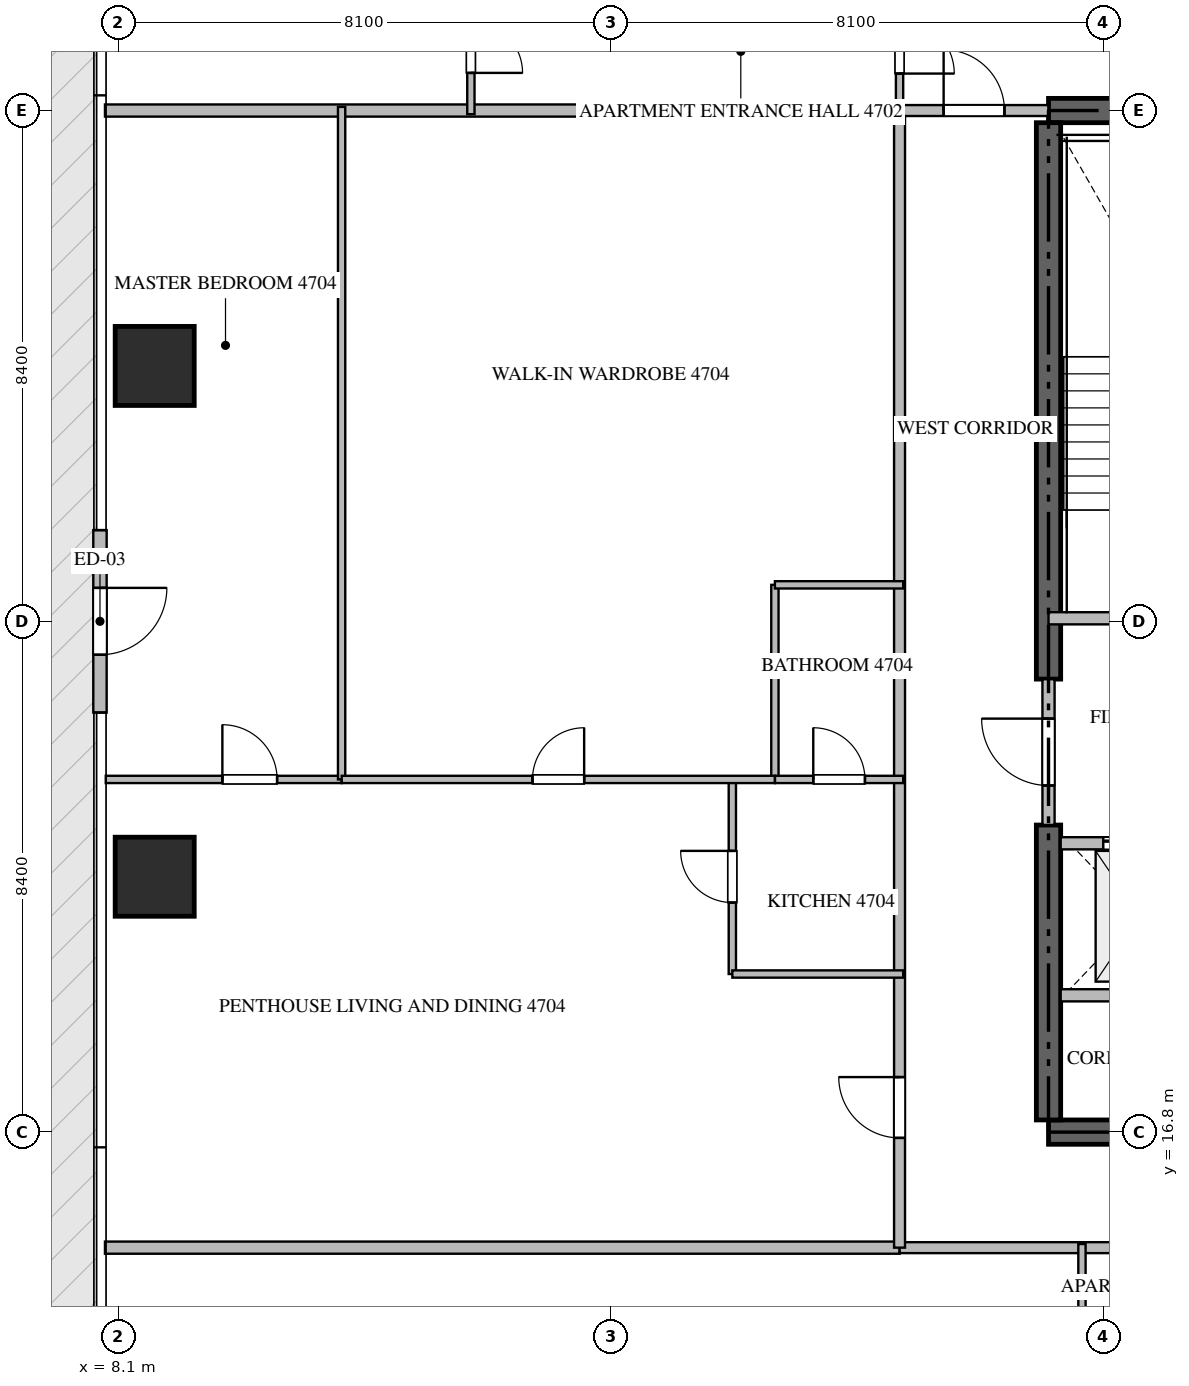
"""IFC4 building model, lengths in metres.
Left out: names, types, materials, properties, quantities, classifications, styles, units other than length and angle.
Written with IfcOpenShell. Run it as: python <this file> out.ifc"""

import sys

from ifc_helpers import new_model, si_unit, direction, frame, frame_2d, origin, origin_2d, place, context, subcontext, project, spatial, rectangle, extrude, source, transform, mapped, element, fill, save


model = new_model("IFC4")
c1 = context("Model", 3, precision=1e-05, world=origin(), true_north=direction((0.0, 1.0)))
c2 = subcontext(c1, "Body", "Model", "MODEL_VIEW")
j1 = project(units=[si_unit("LENGTHUNIT", "METRE"), si_unit("PLANEANGLEUNIT", "RADIAN")], contexts=[c1])
p1 = place(None, origin())
s1 = spatial("IfcSite", under=j1, at=p1, CompositionType="ELEMENT")
p2 = place(p1, origin())
s2 = spatial("IfcBuilding", under=s1, at=p2, CompositionType="ELEMENT")
p3 = place(p2, frame((0.0, 0.0, 187.65)))
s3 = spatial("IfcBuildingStorey", under=s2, at=p3, CompositionType="ELEMENT", Elevation=187.65)
for number, where, z_axis, x_axis in (
    (1, (23.4, 16.8, -0.26), (0.0, 0.0, 1.0), (1.0, 0.0, 0.0)),
    (2, (41.4, 33.6, -0.26), (0.0, 0.0, 1.0), (-1.0, 0.0, 0.0)),
):
    element("IfcWall", number, at=place(p3, frame(where, z_axis=z_axis, x_axis=x_axis)), inside=s3, PredefinedType="SHEAR", context=c2, shape_type="SweptSolid", body=[
        extrude(rectangle(XDim=18.0, YDim=0.4, at=frame_2d((9.0, 0.0))), origin(), (0.0, 0.0, 1.0), 3.748),
    ])
p4 = place(p3, frame((23.4, 17.0, -0.26), z_axis=(0.0, 0.0, 1.0), x_axis=(0.0, 1.0, 0.0)))
e3 = element("IfcWall", 3, at=p4, inside=s3, PredefinedType="SHEAR", context=c2, shape_type="SweptSolid", body=[
    extrude(rectangle(XDim=4.85, YDim=0.4, at=frame_2d((2.425, 0.0))), origin(), (0.0, 0.0, 1.0), 3.748),
])
p5 = place(p3, frame((23.4, 24.25, -0.26), z_axis=(0.0, 0.0, 1.0), x_axis=(0.0, 1.0, 0.0)))
e4 = element("IfcWall", 4, at=p5, inside=s3, PredefinedType="SHEAR", context=c2, shape_type="SweptSolid", body=[
    extrude(rectangle(XDim=9.15, YDim=0.4, at=frame_2d((4.575, 0.0))), origin(), (0.0, 0.0, 1.0), 3.748),
])
m1 = source(origin(), c2, "Body", "SweptSolid", [
    extrude(rectangle(XDim=1.3, YDim=1.3, at=origin_2d()), origin(), (0.0, 0.0, 1.0), 3.75),
])
for number, where, z_axis, x_axis in (
    (5, (8.7, 21.0, -0.26), (0.0, 0.0, 1.0), (1.0, 0.0, 0.0)),
    (6, (8.7, 29.4, -0.26), (0.0, 0.0, 1.0), (1.0, 0.0, 0.0)),
):
    element("IfcColumn", number, at=place(p3, frame(where, z_axis=z_axis, x_axis=x_axis)), inside=s3, PredefinedType="COLUMN", context=c2, shape_type="MappedRepresentation", body=[
        mapped(m1, transform((0.0, 0.0, 0.0), scale=1.0)),
    ])
p6 = place(p3, frame((7.8, 26.7, 0.0), z_axis=(0.0, 0.0, 1.0), x_axis=(0.0, -1.0, 0.0)))
e7 = element("IfcWall", 7, at=p6, inside=s3, PredefinedType="ELEMENTEDWALL", context=c2, shape_type="SweptSolid", body=[
    extrude(rectangle(XDim=3.0, YDim=0.22, at=frame_2d((1.5, 0.0))), origin(), (0.0, 0.0, 1.0), 3.475),
])
p7 = place(p6, frame((0.95, 0.0, 0.0)))
e8 = element("IfcOpeningElement", 8, at=p7, cuts=e7, PredefinedType="OPENING", context=c2, shape_type="SweptSolid", body=[
    extrude(rectangle(XDim=1.1, YDim=2.2, at=frame_2d((0.55, 1.1))), frame((0.0, 0.12, 0.0), z_axis=(0.0, -1.0, 0.0), x_axis=(1.0, 0.0, 0.0)), (0.0, 0.0, 1.0), 0.24),
])
p8 = place(p3, frame((23.4, 25.25, 0.0), z_axis=(0.0, 0.0, 1.0), x_axis=(1.0, 0.0, 0.0)))
e9 = element("IfcWall", 9, at=p8, inside=s3, PredefinedType="STANDARD", context=c2, shape_type="SweptSolid", body=[
    extrude(rectangle(XDim=4.45, YDim=0.2, at=frame_2d((2.225, 0.0))), origin(), (0.0, 0.0, 1.0), 3.49),
])
p9 = place(p8, frame((1.65, 0.0, 0.0)))
e10 = element("IfcOpeningElement", 10, at=p9, cuts=e9, PredefinedType="OPENING", context=c2, shape_type="SweptSolid", body=[
    extrude(rectangle(XDim=1.1, YDim=2.15, at=frame_2d((0.55, 1.075))), frame((0.0, 0.11, 0.0), z_axis=(0.0, -1.0, 0.0), x_axis=(1.0, 0.0, 0.0)), (0.0, 0.0, 1.0), 0.22),
])
p10 = place(p3, frame((23.6, 21.55, 0.0), z_axis=(0.0, 0.0, 1.0), x_axis=(1.0, 0.0, 0.0)))
e11 = element("IfcWall", 11, at=p10, inside=s3, PredefinedType="STANDARD", context=c2, shape_type="SweptSolid", body=[
    extrude(rectangle(XDim=2.45, YDim=0.2, at=frame_2d((1.225, 0.0))), origin(), (0.0, 0.0, 1.0), 3.49),
])
p11 = place(p10, frame((0.7, 0.0, 0.0)))
e12 = element("IfcOpeningElement", 12, at=p11, cuts=e11, PredefinedType="OPENING", context=c2, shape_type="SweptSolid", body=[
    extrude(rectangle(XDim=1.2, YDim=2.2, at=frame_2d((0.6, 1.1))), frame((0.0, 0.11, 0.0), z_axis=(0.0, -1.0, 0.0), x_axis=(1.0, 0.0, 0.0)), (0.0, 0.0, 1.0), 0.22),
])
p12 = place(p3, frame((23.6, 19.05, 0.0), z_axis=(0.0, 0.0, 1.0), x_axis=(1.0, 0.0, 0.0)))
e13 = element("IfcWall", 13, at=p12, inside=s3, PredefinedType="STANDARD", context=c2, shape_type="SweptSolid", body=[
    extrude(rectangle(XDim=2.45, YDim=0.2, at=frame_2d((1.225, 0.0))), origin(), (0.0, 0.0, 1.0), 3.49),
])
p13 = place(p3, frame((23.4, 21.852, 0.0), z_axis=(0.0, 0.0, 1.0), x_axis=(0.0, 1.0, 0.0)))
e14 = element("IfcWall", 14, at=p13, inside=s3, PredefinedType="STANDARD", context=c2, shape_type="SweptSolid", body=[
    extrude(rectangle(XDim=2.396, YDim=0.2, at=frame_2d((1.198, 0.0))), origin(), (0.0, 0.0, 1.0), 3.49),
])
p14 = place(p13, frame((0.648, 0.0, 0.0)))
e15 = element("IfcOpeningElement", 15, at=p14, cuts=e14, PredefinedType="OPENING", context=c2, shape_type="SweptSolid", body=[
    extrude(rectangle(XDim=1.1, YDim=2.15, at=frame_2d((0.55, 1.075))), frame((0.0, 0.11, 0.0), z_axis=(0.0, -1.0, 0.0), x_axis=(1.0, 0.0, 0.0)), (0.0, 0.0, 1.0), 0.22),
])
for number, where, z_axis, x_axis in (
    (16, (7.882, 14.9, 0.0), (0.0, 0.0, 1.0), (1.0, 0.0, 0.0)),
    (17, (7.882, 33.6, 0.0), (0.0, 0.0, 1.0), (1.0, 0.0, 0.0)),
):
    element("IfcWall", number, at=place(p3, frame(where, z_axis=z_axis, x_axis=x_axis)), inside=s3, PredefinedType="PARTITIONING", context=c2, shape_type="SweptSolid", body=[
        extrude(rectangle(XDim=13.068, YDim=0.2, at=frame_2d((6.534, 0.0))), origin(), (0.0, 0.0, 1.0), 3.49),
    ])
p15 = place(p3, frame((20.952, 14.9, 0.0), z_axis=(0.0, 0.0, 1.0), x_axis=(1.0, 0.0, 0.0)))
e18 = element("IfcWall", 18, at=p15, inside=s3, PredefinedType="PARTITIONING", context=c2, shape_type="SweptSolid", body=[
    extrude(rectangle(XDim=22.896, YDim=0.18, at=frame_2d((11.448, 0.0))), origin(), (0.0, 0.0, 1.0), 3.49),
])
p16 = place(p15, frame((15.809, 0.0, 0.0)))
e19 = element("IfcOpeningElement", 19, at=p16, cuts=e18, PredefinedType="OPENING", context=c2, shape_type="SweptSolid", body=[
    extrude(rectangle(XDim=1.0, YDim=2.15, at=frame_2d((0.5, 1.075))), frame((0.0, 0.1, 0.0), z_axis=(0.0, -1.0, 0.0), x_axis=(1.0, 0.0, 0.0)), (0.0, 0.0, 1.0), 0.2),
])
p17 = place(p3, frame((20.95, 14.9, 0.0), z_axis=(0.0, 0.0, 1.0), x_axis=(0.0, 1.0, 0.0)))
e20 = element("IfcWall", 20, at=p17, inside=s3, PredefinedType="PARTITIONING", context=c2, shape_type="SweptSolid", body=[
    extrude(rectangle(XDim=18.7, YDim=0.18, at=frame_2d((9.35, 0.0))), origin(), (0.0, 0.0, 1.0), 3.49),
])
p18 = place(p17, frame((1.805, 0.0, 0.0)))
e21 = element("IfcOpeningElement", 21, at=p18, cuts=e20, PredefinedType="OPENING", context=c2, shape_type="SweptSolid", body=[
    extrude(rectangle(XDim=1.0, YDim=2.15, at=frame_2d((0.5, 1.075))), frame((0.0, 0.1, 0.0), z_axis=(0.0, -1.0, 0.0), x_axis=(1.0, 0.0, 0.0)), (0.0, 0.0, 1.0), 0.2),
])
p19 = place(p3, frame((20.952, 33.6, 0.0), z_axis=(0.0, 0.0, 1.0), x_axis=(1.0, 0.0, 0.0)))
e22 = element("IfcWall", 22, at=p19, inside=s3, PredefinedType="PARTITIONING", context=c2, shape_type="SweptSolid", body=[
    extrude(rectangle(XDim=2.446, YDim=0.18, at=frame_2d((1.223, 0.0))), origin(), (0.0, 0.0, 1.0), 3.49),
])
p20 = place(p19, frame((0.723, 0.0, 0.0)))
e23 = element("IfcOpeningElement", 23, at=p20, cuts=e22, PredefinedType="OPENING", context=c2, shape_type="SweptSolid", body=[
    extrude(rectangle(XDim=1.0, YDim=2.15, at=frame_2d((0.5, 1.075))), frame((0.0, 0.1, 0.0), z_axis=(0.0, -1.0, 0.0), x_axis=(1.0, 0.0, 0.0)), (0.0, 0.0, 1.0), 0.2),
])
p21 = place(p3, frame((23.95, 12.752, 0.0), z_axis=(0.0, 0.0, 1.0), x_axis=(0.0, 1.0, 0.0)))
e24 = element("IfcWall", 24, at=p21, inside=s3, PredefinedType="PARTITIONING", context=c2, shape_type="SweptSolid", body=[
    extrude(rectangle(XDim=2.208, YDim=0.12, at=frame_2d((1.104, 0.0))), origin(), (0.0, 0.0, 1.0), 3.49),
])
p22 = place(p3, frame((20.95, 35.75, 0.0), z_axis=(0.0, 0.0, 1.0), x_axis=(0.0, -1.0, 0.0)))
e25 = element("IfcWall", 25, at=p22, inside=s3, PredefinedType="PARTITIONING", context=c2, shape_type="SweptSolid", body=[
    extrude(rectangle(XDim=2.148, YDim=0.12, at=frame_2d((1.074, 0.0))), origin(), (0.0, 0.0, 1.0), 3.49),
])
p23 = place(p22, frame((0.642, 0.0, 0.0)))
e26 = element("IfcOpeningElement", 26, at=p23, cuts=e25, PredefinedType="OPENING", context=c2, shape_type="SweptSolid", body=[
    extrude(rectangle(XDim=0.9, YDim=2.1, at=frame_2d((0.45, 1.05))), frame((0.0, 0.07, 0.0), z_axis=(0.0, -1.0, 0.0), x_axis=(1.0, 0.0, 0.0)), (0.0, 0.0, 1.0), 0.14),
])
p24 = place(p3, frame((13.9, 35.748, 0.0), z_axis=(0.0, 0.0, 1.0), x_axis=(0.0, -1.0, 0.0)))
e27 = element("IfcWall", 27, at=p24, inside=s3, PredefinedType="PARTITIONING", context=c2, shape_type="SweptSolid", body=[
    extrude(rectangle(XDim=2.208, YDim=0.12, at=frame_2d((1.104, 0.0))), origin(), (0.0, 0.0, 1.0), 3.49),
])
p25 = place(p24, frame((0.679, 0.0, 0.0)))
e28 = element("IfcOpeningElement", 28, at=p25, cuts=e27, PredefinedType="OPENING", context=c2, shape_type="SweptSolid", body=[
    extrude(rectangle(XDim=0.85, YDim=2.1, at=frame_2d((0.425, 1.05))), frame((0.0, 0.07, 0.0), z_axis=(0.0, -1.0, 0.0), x_axis=(1.0, 0.0, 0.0)), (0.0, 0.0, 1.0), 0.14),
])
p26 = place(p3, frame((18.2, 19.4, 0.0), z_axis=(0.0, 0.0, 1.0), x_axis=(0.0, 1.0, 0.0)))
e29 = element("IfcWall", 29, at=p26, inside=s3, PredefinedType="PARTITIONING", context=c2, shape_type="SweptSolid", body=[
    extrude(rectangle(XDim=3.2, YDim=0.12, at=frame_2d((1.6, 0.0))), origin(), (0.0, 0.0, 1.0), 3.49),
])
p27 = place(p26, frame((1.175, 0.0, 0.0)))
e30 = element("IfcOpeningElement", 30, at=p27, cuts=e29, PredefinedType="OPENING", context=c2, shape_type="SweptSolid", body=[
    extrude(rectangle(XDim=0.85, YDim=2.1, at=frame_2d((0.425, 1.05))), frame((0.0, 0.07, 0.0), z_axis=(0.0, -1.0, 0.0), x_axis=(1.0, 0.0, 0.0)), (0.0, 0.0, 1.0), 0.14),
])
p28 = place(p3, frame((18.2, 19.4, 0.0), z_axis=(0.0, 0.0, 1.0), x_axis=(1.0, 0.0, 0.0)))
e31 = element("IfcWall", 31, at=p28, inside=s3, PredefinedType="PARTITIONING", context=c2, shape_type="SweptSolid", body=[
    extrude(rectangle(XDim=2.81, YDim=0.12, at=frame_2d((1.405, 0.0))), origin(), (0.0, 0.0, 1.0), 3.49),
])
p29 = place(p3, frame((7.895, 22.6, 0.0), z_axis=(0.0, 0.0, 1.0), x_axis=(1.0, 0.0, 0.0)))
e32 = element("IfcWall", 32, at=p29, inside=s3, PredefinedType="PARTITIONING", context=c2, shape_type="SweptSolid", body=[
    extrude(rectangle(XDim=3.879, YDim=0.12, at=frame_2d((1.939, 0.0))), origin(), (0.0, 0.0, 1.0), 3.49),
])
p30 = place(p29, frame((1.918, 0.0, 0.0)))
e33 = element("IfcOpeningElement", 33, at=p30, cuts=e32, PredefinedType="OPENING", context=c2, shape_type="SweptSolid", body=[
    extrude(rectangle(XDim=0.9, YDim=2.1, at=frame_2d((0.45, 1.05))), frame((0.0, 0.07, 0.0), z_axis=(0.0, -1.0, 0.0), x_axis=(1.0, 0.0, 0.0)), (0.0, 0.0, 1.0), 0.14),
])
p31 = place(p3, frame((11.774, 22.6, 0.0), z_axis=(0.0, 0.0, 1.0), x_axis=(0.0, 1.0, 0.0)))
e34 = element("IfcWall", 34, at=p31, inside=s3, PredefinedType="PARTITIONING", context=c2, shape_type="SweptSolid", body=[
    extrude(rectangle(XDim=11.06, YDim=0.12, at=frame_2d((5.53, 0.0))), origin(), (0.0, 0.0, 1.0), 3.49),
])
p32 = place(p3, frame((18.9, 22.6, 0.0), z_axis=(0.0, 0.0, 1.0), x_axis=(0.0, 1.0, 0.0)))
e35 = element("IfcWall", 35, at=p32, inside=s3, PredefinedType="PARTITIONING", context=c2, shape_type="SweptSolid", body=[
    extrude(rectangle(XDim=3.2, YDim=0.12, at=frame_2d((1.6, 0.0))), origin(), (0.0, 0.0, 1.0), 3.49),
])
p33 = place(p3, frame((18.9, 25.8, 0.0), z_axis=(0.0, 0.0, 1.0), x_axis=(1.0, 0.0, 0.0)))
e36 = element("IfcWall", 36, at=p33, inside=s3, PredefinedType="PARTITIONING", context=c2, shape_type="SweptSolid", body=[
    extrude(rectangle(XDim=2.11, YDim=0.12, at=frame_2d((1.055, 0.0))), origin(), (0.0, 0.0, 1.0), 3.49),
])
p34 = place(p3, frame((11.776, 22.6, 0.0), z_axis=(0.0, 0.0, 1.0), x_axis=(1.0, 0.0, 0.0)))
e37 = element("IfcWall", 37, at=p34, inside=s3, PredefinedType="PARTITIONING", context=c2, shape_type="SweptSolid", body=[
    extrude(rectangle(XDim=7.124, YDim=0.12, at=frame_2d((3.562, 0.0))), origin(), (0.0, 0.0, 1.0), 3.49),
])
p35 = place(p34, frame((3.137, 0.0, 0.0)))
e38 = element("IfcOpeningElement", 38, at=p35, cuts=e37, PredefinedType="OPENING", context=c2, shape_type="SweptSolid", body=[
    extrude(rectangle(XDim=0.85, YDim=2.1, at=frame_2d((0.425, 1.05))), frame((0.0, 0.07, 0.0), z_axis=(0.0, -1.0, 0.0), x_axis=(1.0, 0.0, 0.0)), (0.0, 0.0, 1.0), 0.14),
])
p36 = place(p3, frame((18.902, 22.6, 0.0), z_axis=(0.0, 0.0, 1.0), x_axis=(1.0, 0.0, 0.0)))
e39 = element("IfcWall", 39, at=p36, inside=s3, PredefinedType="PARTITIONING", context=c2, shape_type="SweptSolid", body=[
    extrude(rectangle(XDim=2.108, YDim=0.12, at=frame_2d((1.054, 0.0))), origin(), (0.0, 0.0, 1.0), 3.49),
])
p37 = place(p36, frame((0.629, 0.0, 0.0)))
e40 = element("IfcOpeningElement", 40, at=p37, cuts=e39, PredefinedType="OPENING", context=c2, shape_type="SweptSolid", body=[
    extrude(rectangle(XDim=0.85, YDim=2.1, at=frame_2d((0.425, 1.05))), frame((0.0, 0.07, 0.0), z_axis=(0.0, -1.0, 0.0), x_axis=(1.0, 0.0, 0.0)), (0.0, 0.0, 1.0), 0.14),
])
m2 = source(origin(), c2, "Body", "SweptSolid", [
    extrude(rectangle(XDim=1.1, YDim=2.2, at=frame_2d((0.55, 1.1))), frame((0.0, 0.025, 0.0), z_axis=(0.0, -1.0, 0.0), x_axis=(1.0, 0.0, 0.0)), (0.0, 0.0, 1.0), 0.05),
])
p38 = place(p7, origin())
e41 = element("IfcDoor", 41, at=p38, inside=s3, OperationType="SINGLE_SWING_LEFT", PredefinedType="DOOR", context=c2, shape_type="MappedRepresentation", body=[
    mapped(m2, transform((0.0, 0.0, 0.0), scale=1.0)),
])
fill(e8, e41)
m3 = source(origin(), c2, "Body", "SweptSolid", [
    extrude(rectangle(XDim=1.2, YDim=2.2, at=frame_2d((0.6, 1.1))), frame((0.0, 0.025, 0.0), z_axis=(0.0, -1.0, 0.0), x_axis=(1.0, 0.0, 0.0)), (0.0, 0.0, 1.0), 0.05),
])
p39 = place(p11, origin())
e42 = element("IfcDoor", 42, at=p39, inside=s3, OperationType="DOUBLE_DOOR_SLIDING", PredefinedType="DOOR", context=c2, shape_type="MappedRepresentation", body=[
    mapped(m3, transform((0.0, 0.0, 0.0), scale=1.0)),
])
fill(e12, e42)
m4 = source(origin(), c2, "Body", "SweptSolid", [
    extrude(rectangle(XDim=1.1, YDim=2.15, at=frame_2d((0.55, 1.075))), frame((0.0, 0.025, 0.0), z_axis=(0.0, -1.0, 0.0), x_axis=(1.0, 0.0, 0.0)), (0.0, 0.0, 1.0), 0.05),
])
p40 = place(p14, origin())
e43 = element("IfcDoor", 43, at=p40, inside=s3, OperationType="SINGLE_SWING_RIGHT", PredefinedType="DOOR", context=c2, shape_type="MappedRepresentation", body=[
    mapped(m4, transform((0.0, 0.0, 0.0), scale=1.0)),
])
fill(e15, e43)
m5 = source(origin(), c2, "Body", "SweptSolid", [
    extrude(rectangle(XDim=1.0, YDim=2.15, at=frame_2d((0.5, 1.075))), frame((0.0, 0.025, 0.0), z_axis=(0.0, -1.0, 0.0), x_axis=(1.0, 0.0, 0.0)), (0.0, 0.0, 1.0), 0.05),
])
p41 = place(p18, origin())
e44 = element("IfcDoor", 44, at=p41, inside=s3, OperationType="SINGLE_SWING_RIGHT", PredefinedType="DOOR", context=c2, shape_type="MappedRepresentation", body=[
    mapped(m5, transform((0.0, 0.0, 0.0), scale=1.0)),
])
fill(e21, e44)
p42 = place(p20, origin())
e45 = element("IfcDoor", 45, at=p42, inside=s3, OperationType="SINGLE_SWING_LEFT", PredefinedType="DOOR", context=c2, shape_type="MappedRepresentation", body=[
    mapped(m5, transform((0.0, 0.0, 0.0), scale=1.0)),
])
fill(e23, e45)
m6 = source(origin(), c2, "Body", "SweptSolid", [
    extrude(rectangle(XDim=0.9, YDim=2.1, at=frame_2d((0.45, 1.05))), frame((0.0, 0.025, 0.0), z_axis=(0.0, -1.0, 0.0), x_axis=(1.0, 0.0, 0.0)), (0.0, 0.0, 1.0), 0.05),
])
p43 = place(p23, origin())
e46 = element("IfcDoor", 46, at=p43, inside=s3, OperationType="SINGLE_SWING_RIGHT", PredefinedType="DOOR", context=c2, shape_type="MappedRepresentation", body=[
    mapped(m6, transform((0.0, 0.0, 0.0), scale=1.0)),
])
fill(e26, e46)
m7 = source(origin(), c2, "Body", "SweptSolid", [
    extrude(rectangle(XDim=0.85, YDim=2.1, at=frame_2d((0.425, 1.05))), frame((0.0, 0.025, 0.0), z_axis=(0.0, -1.0, 0.0), x_axis=(1.0, 0.0, 0.0)), (0.0, 0.0, 1.0), 0.05),
])
p44 = place(p25, origin())
e47 = element("IfcDoor", 47, at=p44, inside=s3, OperationType="SINGLE_SWING_RIGHT", PredefinedType="DOOR", context=c2, shape_type="MappedRepresentation", body=[
    mapped(m7, transform((0.0, 0.0, 0.0), scale=1.0)),
])
fill(e28, e47)
p45 = place(p27, origin())
e48 = element("IfcDoor", 48, at=p45, inside=s3, OperationType="SINGLE_SWING_RIGHT", PredefinedType="DOOR", context=c2, shape_type="MappedRepresentation", body=[
    mapped(m7, transform((0.0, 0.0, 0.0), scale=1.0)),
])
fill(e30, e48)
p46 = place(p30, origin())
e49 = element("IfcDoor", 49, at=p46, inside=s3, OperationType="SINGLE_SWING_LEFT", PredefinedType="DOOR", context=c2, shape_type="MappedRepresentation", body=[
    mapped(m6, transform((0.0, 0.0, 0.0), scale=1.0)),
])
fill(e33, e49)
p47 = place(p35, origin())
e50 = element("IfcDoor", 50, at=p47, inside=s3, OperationType="SINGLE_SWING_RIGHT", PredefinedType="DOOR", context=c2, shape_type="MappedRepresentation", body=[
    mapped(m7, transform((0.0, 0.0, 0.0), scale=1.0)),
])
fill(e38, e50)
p48 = place(p37, origin())
e51 = element("IfcDoor", 51, at=p48, inside=s3, OperationType="SINGLE_SWING_LEFT", PredefinedType="DOOR", context=c2, shape_type="MappedRepresentation", body=[
    mapped(m7, transform((0.0, 0.0, 0.0), scale=1.0)),
])
fill(e40, e51)
save(model, sys.argv[1])
